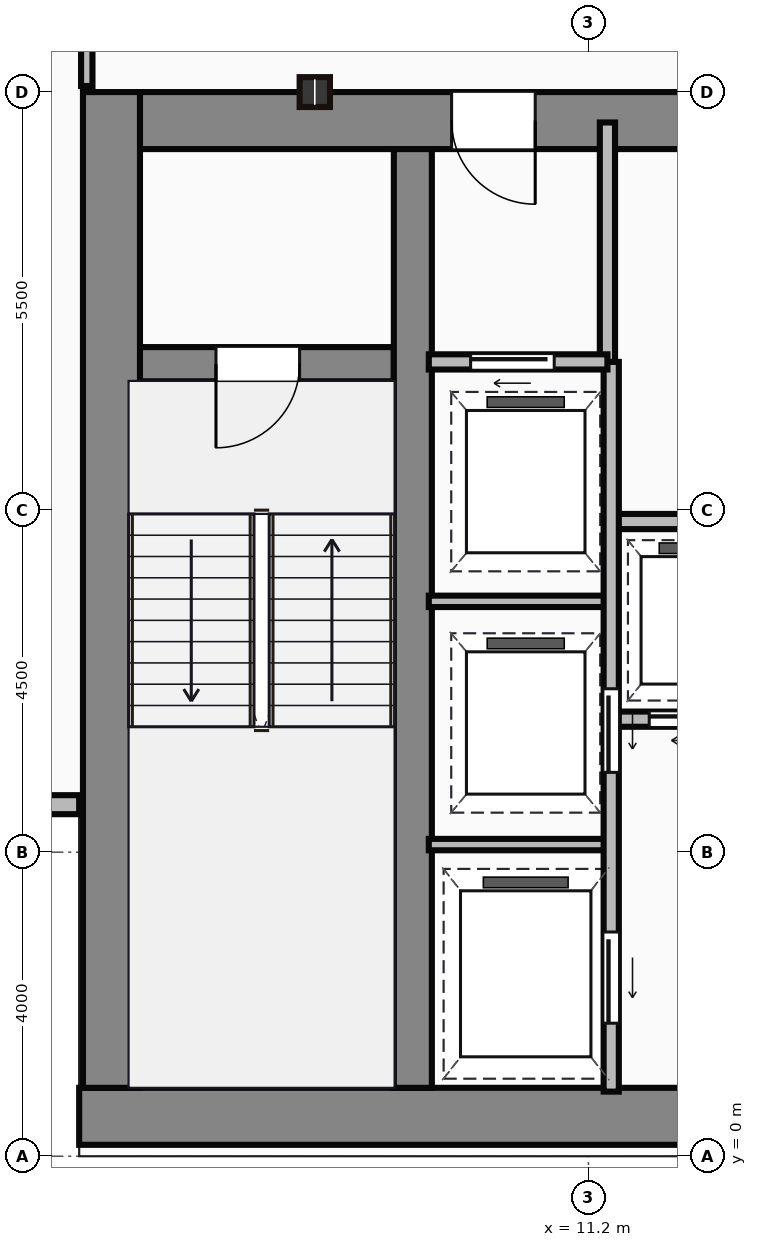
"""IFC4 building model, lengths in metres.
Left out: names, types, materials, properties, quantities, classifications, styles, units other than length and angle.
Written with IfcOpenShell. Run it as: python <this file> out.ifc"""

import sys

from ifc_helpers import new_model, si_unit, direction, frame, frame_2d, origin, origin_2d, place, context, subcontext, project, spatial, rectangle, i_section, extrude, source, transform, mapped, element, fill, save


model = new_model("IFC4")
c1 = context("Model", 3, precision=1e-05, world=origin(), true_north=direction((0.0, 1.0)))
c2 = subcontext(c1, "Body", "Model", "MODEL_VIEW")
j1 = project(units=[si_unit("LENGTHUNIT", "METRE"), si_unit("PLANEANGLEUNIT", "RADIAN")], contexts=[c1])
p1 = place(None, origin())
s1 = spatial("IfcSite", under=j1, at=p1, CompositionType="ELEMENT")
p2 = place(p1, origin())
s2 = spatial("IfcBuilding", under=s1, at=p2, CompositionType="ELEMENT")
p3 = place(p2, frame((0.0, 0.0, 88.65)))
s3 = spatial("IfcBuildingStorey", under=s2, at=p3, CompositionType="ELEMENT", Elevation=88.65)
m1 = source(origin(), c2, "Body", "SweptSolid", [
    extrude(rectangle(XDim=29.5, YDim=0.75, at=frame_2d((14.75, 0.0))), origin(), (0.0, 0.0, 1.0), 3.65),
])
p4 = place(p3, frame((4.5, 0.525, 0.0), z_axis=(0.0, 0.0, 1.0), x_axis=(1.0, 0.0, 0.0)))
e1 = element("IfcWall", 1, at=p4, inside=s3, PredefinedType="SHEAR", context=c2, shape_type="MappedRepresentation", body=[
    mapped(m1, transform((0.0, 0.0, 0.0))),
])
m2 = source(origin(), c2, "Body", "SweptSolid", [
    extrude(rectangle(XDim=13.1, YDim=0.75, at=frame_2d((6.55, 0.0))), origin(), (0.0, 0.0, 1.0), 3.65),
])
p5 = place(p3, frame((4.925, 0.9, 0.0), z_axis=(0.0, 0.0, 1.0), x_axis=(0.0, 1.0, 0.0)))
e2 = element("IfcWall", 2, at=p5, inside=s3, PredefinedType="SHEAR", context=c2, shape_type="MappedRepresentation", body=[
    mapped(m2, transform((0.0, 0.0, 0.0))),
])
m3 = source(origin(), c2, "Body", "SweptSolid", [
    extrude(rectangle(XDim=9.1, YDim=0.75, at=frame_2d((4.55, 0.0))), origin(), (0.0, 0.0, 1.0), 3.65),
])
p6 = place(p3, frame((5.3, 13.625, 0.0), z_axis=(0.0, 0.0, 1.0), x_axis=(1.0, 0.0, 0.0)))
e3 = element("IfcWall", 3, at=p6, inside=s3, PredefinedType="SHEAR", context=c2, shape_type="MappedRepresentation", body=[
    mapped(m3, transform((0.0, 0.0, 0.0))),
])
p7 = place(p6, frame((4.1, 0.0, 0.0)))
e4 = element("IfcOpeningElement", 4, at=p7, cuts=e3, PredefinedType="OPENING", context=c2, shape_type="SweptSolid", body=[
    extrude(rectangle(XDim=1.1, YDim=2.15, at=frame_2d((0.55, 1.075))), frame((0.0, 0.385, 0.0), z_axis=(0.0, -1.0, 0.0), x_axis=(1.0, 0.0, 0.0)), (0.0, 0.0, 1.0), 0.77),
])
m4 = source(origin(), c2, "Body", "SweptSolid", [
    extrude(rectangle(XDim=12.35, YDim=0.5, at=frame_2d((6.175, 0.0))), origin(), (0.0, 0.0, 1.0), 3.65),
])
p8 = place(p3, frame((8.89, 0.9, 0.0), z_axis=(0.0, 0.0, 1.0), x_axis=(0.0, 1.0, 0.0)))
e5 = element("IfcWall", 5, at=p8, inside=s3, PredefinedType="SHEAR", context=c2, shape_type="MappedRepresentation", body=[
    mapped(m4, transform((0.0, 0.0, 0.0))),
])
m5 = source(origin(), c2, "Body", "SweptSolid", [
    extrude(rectangle(XDim=3.39, YDim=0.45, at=frame_2d((1.695, 0.0))), origin(), (0.0, 0.0, 1.0), 3.65),
])
p9 = place(p3, frame((5.25, 10.42, 0.0), z_axis=(0.0, 0.0, 1.0), x_axis=(1.0, 0.0, 0.0)))
e6 = element("IfcWall", 6, at=p9, inside=s3, PredefinedType="SHEAR", context=c2, shape_type="MappedRepresentation", body=[
    mapped(m5, transform((0.0, 0.0, 0.0))),
])
p10 = place(p9, frame((1.05, 0.0, 0.0)))
e7 = element("IfcOpeningElement", 7, at=p10, cuts=e6, PredefinedType="OPENING", context=c2, shape_type="SweptSolid", body=[
    extrude(rectangle(XDim=1.1, YDim=2.15, at=frame_2d((0.55, 1.075))), frame((0.0, 0.235, 0.0), z_axis=(0.0, -1.0, 0.0), x_axis=(1.0, 0.0, 0.0)), (0.0, 0.0, 1.0), 0.47),
])
m6 = source(origin(), c2, "Body", "SweptSolid", [
    extrude(i_section(OverallWidth=0.399, OverallDepth=0.393, WebThickness=0.023, FlangeThickness=0.037, at=origin_2d()), origin(), (0.0, 0.0, 1.0), 3.65),
])
p11 = place(p3, frame((7.6, 14.0, 0.0), z_axis=(0.0, 0.0, 1.0), x_axis=(1.0, 0.0, 0.0)))
e8 = element("IfcColumn", 8, at=p11, inside=s3, PredefinedType="COLUMN", context=c2, shape_type="MappedRepresentation", body=[
    mapped(m6, transform((0.0, 0.0, 0.0))),
])
m7 = source(origin(), c2, "Body", "SweptSolid", [
    extrude(rectangle(XDim=4.5, YDim=0.25, at=frame_2d((2.25, 0.0))), origin(), (0.0, 0.0, 1.0), 3.4),
])
p12 = place(p3, frame((0.0, 4.625, 0.0), z_axis=(0.0, 0.0, 1.0), x_axis=(1.0, 0.0, 0.0)))
e9 = element("IfcWall", 9, at=p12, inside=s3, PredefinedType="STANDARD", context=c2, shape_type="MappedRepresentation", body=[
    mapped(m7, transform((0.0, 0.0, 0.0))),
])
m8 = source(origin(), c2, "Body", "SweptSolid", [
    extrude(rectangle(XDim=3.18, YDim=0.2, at=frame_2d((1.59, 0.0))), origin(), (0.0, 0.0, 1.0), 3.4),
])
p13 = place(p3, frame((11.45, 10.42, 0.0), z_axis=(0.0, 0.0, 1.0), x_axis=(0.0, 1.0, 0.0)))
e10 = element("IfcWall", 10, at=p13, inside=s3, PredefinedType="PARTITIONING", context=c2, shape_type="MappedRepresentation", body=[
    mapped(m8, transform((0.0, 0.0, 0.0))),
])
m9 = source(origin(), c2, "Body", "SweptSolid", [
    extrude(rectangle(XDim=2.35, YDim=0.2, at=frame_2d((1.175, 0.0))), origin(), (0.0, 0.0, 1.0), 3.4),
])
p14 = place(p3, frame((9.1, 10.45, 0.0), z_axis=(0.0, 0.0, 1.0), x_axis=(1.0, 0.0, 0.0)))
e11 = element("IfcWall", 11, at=p14, inside=s3, PredefinedType="PARTITIONING", context=c2, shape_type="MappedRepresentation", body=[
    mapped(m9, transform((0.0, 0.0, 0.0))),
])
p15 = place(p14, frame((0.55, 0.0, 0.0)))
e12 = element("IfcOpeningElement", 12, at=p15, cuts=e11, PredefinedType="OPENING", context=c2, shape_type="SweptSolid", body=[
    extrude(rectangle(XDim=1.1, YDim=2.15, at=frame_2d((0.55, 1.075))), frame((0.0, 0.11, 0.0), z_axis=(0.0, -1.0, 0.0), x_axis=(1.0, 0.0, 0.0)), (0.0, 0.0, 1.0), 0.22),
])
m10 = source(origin(), c2, "Body", "SweptSolid", [
    extrude(rectangle(XDim=9.6, YDim=0.2, at=frame_2d((4.8, 0.0))), origin(), (0.0, 0.0, 1.0), 3.4),
])
p16 = place(p3, frame((11.5, 0.85, 0.0), z_axis=(0.0, 0.0, 1.0), x_axis=(0.0, 1.0, 0.0)))
e13 = element("IfcWall", 13, at=p16, inside=s3, PredefinedType="PARTITIONING", context=c2, shape_type="MappedRepresentation", body=[
    mapped(m10, transform((0.0, 0.0, 0.0))),
])
p17 = place(p16, frame((4.2, 0.0, 0.0)))
e14 = element("IfcOpeningElement", 14, at=p17, cuts=e13, PredefinedType="OPENING", context=c2, shape_type="SweptSolid", body=[
    extrude(rectangle(XDim=1.1, YDim=2.15, at=frame_2d((0.55, 1.075))), frame((0.0, 0.11, 0.0), z_axis=(0.0, -1.0, 0.0), x_axis=(1.0, 0.0, 0.0)), (0.0, 0.0, 1.0), 0.22),
])
p18 = place(p16, frame((0.9, 0.0, 0.0)))
e15 = element("IfcOpeningElement", 15, at=p18, cuts=e13, PredefinedType="OPENING", context=c2, shape_type="SweptSolid", body=[
    extrude(rectangle(XDim=1.2, YDim=2.15, at=frame_2d((0.6, 1.075))), frame((0.0, 0.11, 0.0), z_axis=(0.0, -1.0, 0.0), x_axis=(1.0, 0.0, 0.0)), (0.0, 0.0, 1.0), 0.22),
])
m11 = source(origin(), c2, "Body", "SweptSolid", [
    extrude(rectangle(XDim=2.4, YDim=0.15, at=frame_2d((1.2, 0.0))), origin(), (0.0, 0.0, 1.0), 3.4),
])
for number, where, z_axis, x_axis in (
    (16, (9.1, 4.1, 0.0), (0.0, 0.0, 1.0), (1.0, 0.0, 0.0)),
    (17, (9.1, 7.3, 0.0), (0.0, 0.0, 1.0), (1.0, 0.0, 0.0)),
):
    element("IfcWall", number, at=place(p3, frame(where, z_axis=z_axis, x_axis=x_axis)), inside=s3, PredefinedType="PARTITIONING", context=c2, shape_type="MappedRepresentation", body=[
        mapped(m11, transform((0.0, 0.0, 0.0))),
    ])
m12 = source(origin(), c2, "Body", "SweptSolid", [
    extrude(rectangle(XDim=11.85, YDim=0.2, at=frame_2d((5.925, 0.0))), origin(), (0.0, 0.0, 1.0), 3.4),
])
p19 = place(p3, frame((11.55, 5.75, 0.0), z_axis=(0.0, 0.0, 1.0), x_axis=(1.0, 0.0, 0.0)))
e18 = element("IfcWall", 18, at=p19, inside=s3, PredefinedType="PARTITIONING", context=c2, shape_type="MappedRepresentation", body=[
    mapped(m12, transform((0.0, 0.0, 0.0))),
])
p20 = place(p19, frame((0.45, 0.0, 0.0)))
e19 = element("IfcOpeningElement", 19, at=p20, cuts=e18, PredefinedType="OPENING", context=c2, shape_type="SweptSolid", body=[
    extrude(rectangle(XDim=1.05, YDim=2.15, at=frame_2d((0.525, 1.075))), frame((0.0, 0.11, 0.0), z_axis=(0.0, -1.0, 0.0), x_axis=(1.0, 0.0, 0.0)), (0.0, 0.0, 1.0), 0.22),
])
p21 = place(p19, frame((2.4, 0.0, 0.0)))
e20 = element("IfcOpeningElement", 20, at=p21, cuts=e18, PredefinedType="OPENING", context=c2, shape_type="SweptSolid", body=[
    extrude(rectangle(XDim=1.05, YDim=2.15, at=frame_2d((0.525, 1.075))), frame((0.0, 0.11, 0.0), z_axis=(0.0, -1.0, 0.0), x_axis=(1.0, 0.0, 0.0)), (0.0, 0.0, 1.0), 0.22),
])
p22 = place(p19, frame((4.35, 0.0, 0.0)))
e21 = element("IfcOpeningElement", 21, at=p22, cuts=e18, PredefinedType="OPENING", context=c2, shape_type="SweptSolid", body=[
    extrude(rectangle(XDim=1.05, YDim=2.15, at=frame_2d((0.525, 1.075))), frame((0.0, 0.11, 0.0), z_axis=(0.0, -1.0, 0.0), x_axis=(1.0, 0.0, 0.0)), (0.0, 0.0, 1.0), 0.22),
])
p23 = place(p19, frame((6.3, 0.0, 0.0)))
e22 = element("IfcOpeningElement", 22, at=p23, cuts=e18, PredefinedType="OPENING", context=c2, shape_type="SweptSolid", body=[
    extrude(rectangle(XDim=1.05, YDim=2.15, at=frame_2d((0.525, 1.075))), frame((0.0, 0.11, 0.0), z_axis=(0.0, -1.0, 0.0), x_axis=(1.0, 0.0, 0.0)), (0.0, 0.0, 1.0), 0.22),
])
p24 = place(p19, frame((8.25, 0.0, 0.0)))
e23 = element("IfcOpeningElement", 23, at=p24, cuts=e18, PredefinedType="OPENING", context=c2, shape_type="SweptSolid", body=[
    extrude(rectangle(XDim=1.05, YDim=2.15, at=frame_2d((0.525, 1.075))), frame((0.0, 0.11, 0.0), z_axis=(0.0, -1.0, 0.0), x_axis=(1.0, 0.0, 0.0)), (0.0, 0.0, 1.0), 0.22),
])
p25 = place(p19, frame((10.2, 0.0, 0.0)))
e24 = element("IfcOpeningElement", 24, at=p25, cuts=e18, PredefinedType="OPENING", context=c2, shape_type="SweptSolid", body=[
    extrude(rectangle(XDim=1.05, YDim=2.15, at=frame_2d((0.525, 1.075))), frame((0.0, 0.11, 0.0), z_axis=(0.0, -1.0, 0.0), x_axis=(1.0, 0.0, 0.0)), (0.0, 0.0, 1.0), 0.22),
])
p26 = place(p3, frame((11.55, 8.35, 0.0), z_axis=(0.0, 0.0, 1.0), x_axis=(1.0, 0.0, 0.0)))
e25 = element("IfcWall", 25, at=p26, inside=s3, PredefinedType="PARTITIONING", context=c2, shape_type="MappedRepresentation", body=[
    mapped(m12, transform((0.0, 0.0, 0.0))),
])
m13 = source(origin(), c2, "Body", "SweptSolid", [
    extrude(rectangle(XDim=2.22, YDim=0.15, at=frame_2d((1.11, 0.0))), origin(), (0.0, 0.0, 1.0), 3.4),
])
p27 = place(p3, frame((4.6, 14.08, 0.0), z_axis=(0.0, 0.0, 1.0), x_axis=(0.0, 1.0, 0.0)))
e26 = element("IfcWall", 26, at=p27, inside=s3, PredefinedType="PARTITIONING", context=c2, shape_type="MappedRepresentation", body=[
    mapped(m13, transform((0.0, 0.0, 0.0))),
])
m14 = source(origin(), c2, "Body", "SweptSolid", [
    extrude(rectangle(XDim=1.1, YDim=2.15, at=frame_2d((0.55, 1.075))), frame((0.0, 0.025, 0.0), z_axis=(0.0, -1.0, 0.0), x_axis=(1.0, 0.0, 0.0)), (0.0, 0.0, 1.0), 0.05),
])
p28 = place(p10, frame((1.1, 0.0, 0.0), z_axis=(0.0, 0.0, 1.0), x_axis=(-1.0, 0.0, 0.0)))
e27 = element("IfcDoor", 27, at=p28, inside=s3, OperationType="SINGLE_SWING_LEFT", PredefinedType="DOOR", context=c2, shape_type="MappedRepresentation", body=[
    mapped(m14, transform((0.0, 0.0, 0.0))),
])
fill(e7, e27)
p29 = place(p7, origin())
e28 = element("IfcDoor", 28, at=p29, inside=s3, OperationType="SINGLE_SWING_RIGHT", PredefinedType="DOOR", context=c2, shape_type="MappedRepresentation", body=[
    mapped(m14, transform((0.0, 0.0, 0.0))),
])
fill(e4, e28)
p30 = place(p15, origin())
e29 = element("IfcDoor", 29, at=p30, inside=s3, OperationType="SLIDING_TO_LEFT", PredefinedType="DOOR", context=c2, shape_type="MappedRepresentation", body=[
    mapped(m14, transform((0.0, 0.0, 0.0))),
])
fill(e12, e29)
p31 = place(p17, frame((1.1, 0.0, 0.0), z_axis=(0.0, 0.0, 1.0), x_axis=(-1.0, 0.0, 0.0)))
e30 = element("IfcDoor", 30, at=p31, inside=s3, OperationType="SLIDING_TO_LEFT", PredefinedType="DOOR", context=c2, shape_type="MappedRepresentation", body=[
    mapped(m14, transform((0.0, 0.0, 0.0))),
])
fill(e14, e30)
m15 = source(origin(), c2, "Body", "SweptSolid", [
    extrude(rectangle(XDim=1.2, YDim=2.15, at=frame_2d((0.6, 1.075))), frame((0.0, 0.025, 0.0), z_axis=(0.0, -1.0, 0.0), x_axis=(1.0, 0.0, 0.0)), (0.0, 0.0, 1.0), 0.05),
])
p32 = place(p18, frame((1.2, 0.0, 0.0), z_axis=(0.0, 0.0, 1.0), x_axis=(-1.0, 0.0, 0.0)))
e31 = element("IfcDoor", 31, at=p32, inside=s3, OperationType="SLIDING_TO_LEFT", PredefinedType="DOOR", context=c2, shape_type="MappedRepresentation", body=[
    mapped(m15, transform((0.0, 0.0, 0.0))),
])
fill(e15, e31)
m16 = source(origin(), c2, "Body", "SweptSolid", [
    extrude(rectangle(XDim=1.05, YDim=2.15, at=frame_2d((0.525, 1.075))), frame((0.0, 0.025, 0.0), z_axis=(0.0, -1.0, 0.0), x_axis=(1.0, 0.0, 0.0)), (0.0, 0.0, 1.0), 0.05),
])
p33 = place(p20, frame((1.05, 0.0, 0.0), z_axis=(0.0, 0.0, 1.0), x_axis=(-1.0, 0.0, 0.0)))
e32 = element("IfcDoor", 32, at=p33, inside=s3, OperationType="SLIDING_TO_LEFT", PredefinedType="DOOR", context=c2, shape_type="MappedRepresentation", body=[
    mapped(m16, transform((0.0, 0.0, 0.0))),
])
fill(e19, e32)
save(model, sys.argv[1])
